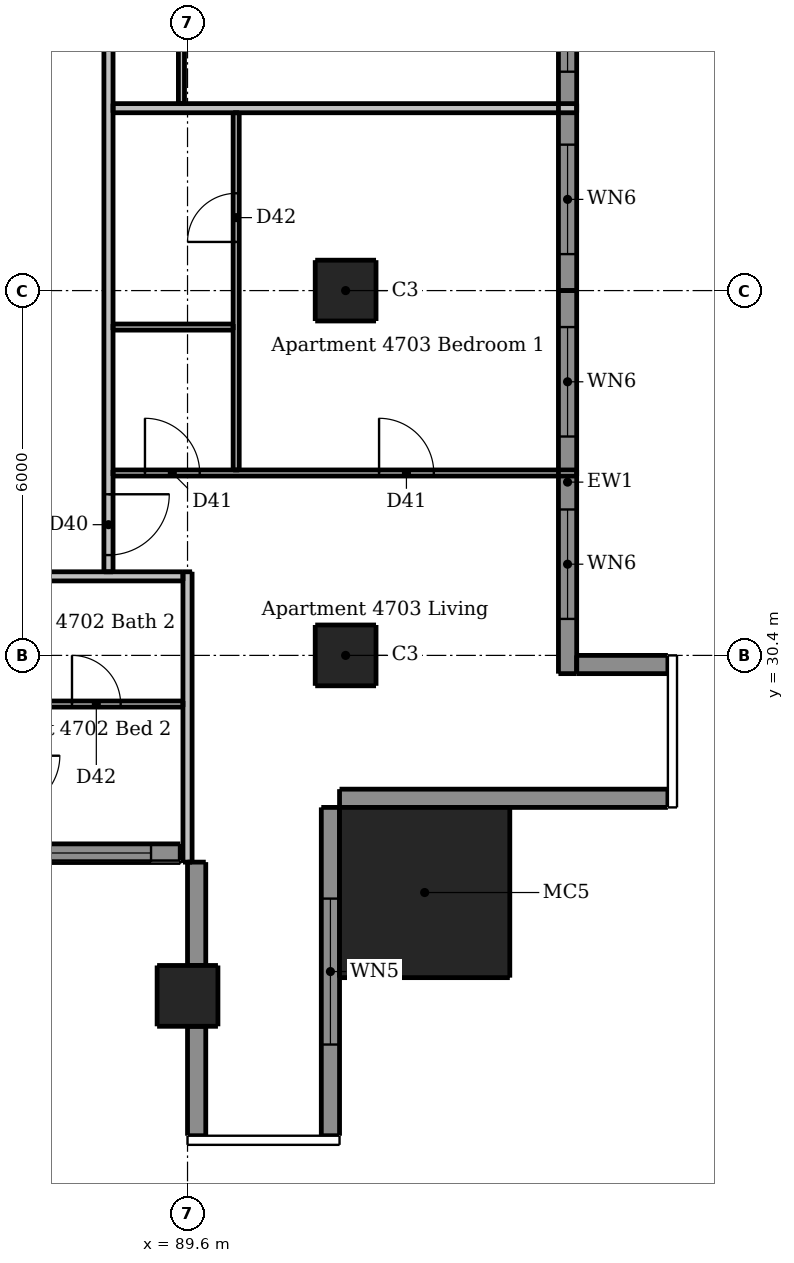
"""IFC4 building model, lengths in metres.
Left out: names, types, materials, properties, quantities, classifications, styles, units other than length and angle.
Written with IfcOpenShell. Run it as: python <this file> out.ifc"""

import sys

from ifc_helpers import new_model, si_unit, direction, frame, frame_2d, origin, origin_2d, place, context, subcontext, project, spatial, rectangle, extrude, element, fill, save


model = new_model("IFC4")
c1 = context("Model", 3, precision=1e-05, world=origin(), true_north=direction((0.0, 1.0)))
c2 = subcontext(c1, "Body", "Model", "MODEL_VIEW")
j1 = project(units=[si_unit("LENGTHUNIT", "METRE"), si_unit("PLANEANGLEUNIT", "RADIAN")], contexts=[c1])
p1 = place(None, origin())
s1 = spatial("IfcSite", under=j1, at=p1, CompositionType="ELEMENT")
p2 = place(p1, origin())
s2 = spatial("IfcBuilding", under=s1, at=p2, CompositionType="ELEMENT")
p3 = place(p2, frame((0.0, 0.0, 174.7)))
s3 = spatial("IfcBuildingStorey", under=s2, at=p3, CompositionType="ELEMENT", Elevation=174.7)
for number, where, z_axis, x_axis in (
    (1, (89.6, 24.8, 0.0), (0.0, 0.0, 1.0), (1.0, 0.0, 0.0)),
    (2, (92.2, 30.4, 0.0), (0.0, 0.0, 1.0), (1.0, 0.0, 0.0)),
    (3, (92.2, 36.4, 0.0), (0.0, 0.0, 1.0), (1.0, 0.0, 0.0)),
):
    element("IfcColumn", number, at=place(p3, frame(where, z_axis=z_axis, x_axis=x_axis)), inside=s3, PredefinedType="COLUMN", context=c2, shape_type="SweptSolid", body=[
        extrude(rectangle(XDim=1.0, YDim=1.0, at=origin_2d()), origin(), (0.0, 0.0, 1.0), 2.95),
    ])
p4 = place(p3, frame((93.5, 26.5, 0.0), z_axis=(0.0, 0.0, 1.0), x_axis=(1.0, 0.0, 0.0)))
e4 = element("IfcColumn", 4, at=p4, inside=s3, PredefinedType="COLUMN", context=c2, shape_type="SweptSolid", body=[
    extrude(rectangle(XDim=2.8, YDim=2.8, at=origin_2d()), origin(), (0.0, 0.0, 1.0), 3.3),
])
p5 = place(p3, frame((89.75, 27.0, 0.0), z_axis=(0.0, 0.0, 1.0), x_axis=(0.0, -1.0, 0.0)))
e5 = element("IfcWall", 5, at=p5, inside=s3, PredefinedType="SOLIDWALL", context=c2, shape_type="SweptSolid", body=[
    extrude(rectangle(XDim=1.7, YDim=0.3, at=frame_2d((0.85, 0.0))), origin(), (0.0, 0.0, 1.0), 2.95),
])
p6 = place(p3, frame((89.75, 24.3, 0.0), z_axis=(0.0, 0.0, 1.0), x_axis=(0.0, -1.0, 0.0)))
e6 = element("IfcWall", 6, at=p6, inside=s3, PredefinedType="SOLIDWALL", context=c2, shape_type="SweptSolid", body=[
    extrude(rectangle(XDim=1.8, YDim=0.3, at=frame_2d((0.9, 0.0))), origin(), (0.0, 0.0, 1.0), 2.95),
])
p7 = place(p3, frame((91.95, 22.5, 0.0), z_axis=(0.0, 0.0, 1.0), x_axis=(0.0, 1.0, 0.0)))
e7 = element("IfcWall", 7, at=p7, inside=s3, PredefinedType="SOLIDWALL", context=c2, shape_type="SweptSolid", body=[
    extrude(rectangle(XDim=5.4, YDim=0.3, at=frame_2d((2.7, 0.0))), origin(), (0.0, 0.0, 1.0), 2.95),
])
p8 = place(p7, frame((1.5, 0.0, 0.15)))
e8 = element("IfcOpeningElement", 8, at=p8, cuts=e7, PredefinedType="OPENING", context=c2, shape_type="SweptSolid", body=[
    extrude(rectangle(XDim=2.4, YDim=2.1, at=frame_2d((1.2, 1.05))), frame((0.0, 0.16, 0.0), z_axis=(0.0, -1.0, 0.0), x_axis=(1.0, 0.0, 0.0)), (0.0, 0.0, 1.0), 0.32),
])
p9 = place(p3, frame((92.1, 28.05, 0.0), z_axis=(0.0, 0.0, 1.0), x_axis=(1.0, 0.0, 0.0)))
e9 = element("IfcWall", 9, at=p9, inside=s3, PredefinedType="SOLIDWALL", context=c2, shape_type="SweptSolid", body=[
    extrude(rectangle(XDim=5.4, YDim=0.3, at=frame_2d((2.7, 0.0))), origin(), (0.0, 0.0, 1.0), 2.95),
])
p10 = place(p3, frame((97.5, 30.25, 0.0), z_axis=(0.0, 0.0, 1.0), x_axis=(-1.0, 0.0, 0.0)))
e10 = element("IfcWall", 10, at=p10, inside=s3, PredefinedType="SOLIDWALL", context=c2, shape_type="SweptSolid", body=[
    extrude(rectangle(XDim=1.5, YDim=0.3, at=frame_2d((0.75, 0.0))), origin(), (0.0, 0.0, 1.0), 2.95),
])
p11 = place(p3, frame((83.72, 27.15, 0.0), z_axis=(0.0, 0.0, 1.0), x_axis=(1.0, 0.0, 0.0)))
e11 = element("IfcWall", 11, at=p11, inside=s3, PredefinedType="SOLIDWALL", context=c2, shape_type="SweptSolid", body=[
    extrude(rectangle(XDim=5.76, YDim=0.3, at=frame_2d((2.88, 0.0))), origin(), (0.0, 0.0, 1.0), 2.95),
])
p12 = place(p11, frame((0.48, 0.0, 0.15)))
e12 = element("IfcOpeningElement", 12, at=p12, cuts=e11, PredefinedType="OPENING", context=c2, shape_type="SweptSolid", body=[
    extrude(rectangle(XDim=1.8, YDim=2.1, at=frame_2d((0.9, 1.05))), frame((0.0, 0.16, 0.0), z_axis=(0.0, -1.0, 0.0), x_axis=(1.0, 0.0, 0.0)), (0.0, 0.0, 1.0), 0.32),
])
p13 = place(p11, frame((3.48, 0.0, 0.15)))
e13 = element("IfcOpeningElement", 13, at=p13, cuts=e11, PredefinedType="OPENING", context=c2, shape_type="SweptSolid", body=[
    extrude(rectangle(XDim=1.8, YDim=2.1, at=frame_2d((0.9, 1.05))), frame((0.0, 0.16, 0.0), z_axis=(0.0, -1.0, 0.0), x_axis=(1.0, 0.0, 0.0)), (0.0, 0.0, 1.0), 0.32),
])
p14 = place(p3, frame((95.85, 30.1, 0.0), z_axis=(0.0, 0.0, 1.0), x_axis=(0.0, 1.0, 0.0)))
e14 = element("IfcWall", 14, at=p14, inside=s3, PredefinedType="SOLIDWALL", context=c2, shape_type="SweptSolid", body=[
    extrude(rectangle(XDim=6.3, YDim=0.3, at=frame_2d((3.15, 0.0))), origin(), (0.0, 0.0, 1.0), 2.34),
])
p15 = place(p14, frame((0.9, 0.0, 0.15)))
e15 = element("IfcOpeningElement", 15, at=p15, cuts=e14, PredefinedType="OPENING", context=c2, shape_type="SweptSolid", body=[
    extrude(rectangle(XDim=1.8, YDim=2.1, at=frame_2d((0.9, 1.05))), frame((0.0, 0.16, 0.0), z_axis=(0.0, -1.0, 0.0), x_axis=(1.0, 0.0, 0.0)), (0.0, 0.0, 1.0), 0.32),
])
p16 = place(p14, frame((3.9, 0.0, 0.15)))
e16 = element("IfcOpeningElement", 16, at=p16, cuts=e14, PredefinedType="OPENING", context=c2, shape_type="SweptSolid", body=[
    extrude(rectangle(XDim=1.8, YDim=2.1, at=frame_2d((0.9, 1.05))), frame((0.0, 0.16, 0.0), z_axis=(0.0, -1.0, 0.0), x_axis=(1.0, 0.0, 0.0)), (0.0, 0.0, 1.0), 0.32),
])
p17 = place(p3, frame((95.85, 36.4, 0.0), z_axis=(0.0, 0.0, 1.0), x_axis=(0.0, 1.0, 0.0)))
e17 = element("IfcWall", 17, at=p17, inside=s3, PredefinedType="SOLIDWALL", context=c2, shape_type="SweptSolid", body=[
    extrude(rectangle(XDim=5.7, YDim=0.3, at=frame_2d((2.85, 0.0))), origin(), (0.0, 0.0, 1.0), 2.34),
])
p18 = place(p17, frame((0.6, 0.0, 0.15)))
e18 = element("IfcOpeningElement", 18, at=p18, cuts=e17, PredefinedType="OPENING", context=c2, shape_type="SweptSolid", body=[
    extrude(rectangle(XDim=1.8, YDim=2.1, at=frame_2d((0.9, 1.05))), frame((0.0, 0.16, 0.0), z_axis=(0.0, -1.0, 0.0), x_axis=(1.0, 0.0, 0.0)), (0.0, 0.0, 1.0), 0.32),
])
p19 = place(p17, frame((3.6, 0.0, 0.15)))
e19 = element("IfcOpeningElement", 19, at=p19, cuts=e17, PredefinedType="OPENING", context=c2, shape_type="SweptSolid", body=[
    extrude(rectangle(XDim=1.8, YDim=2.1, at=frame_2d((0.9, 1.05))), frame((0.0, 0.16, 0.0), z_axis=(0.0, -1.0, 0.0), x_axis=(1.0, 0.0, 0.0)), (0.0, 0.0, 1.0), 0.32),
])
p20 = place(p3, frame((89.5, 60.325, 0.0), z_axis=(0.0, 0.0, 1.0), x_axis=(0.0, -1.0, 0.0)))
e20 = element("IfcWall", 20, at=p20, inside=s3, PredefinedType="PARTITIONING", context=c2, shape_type="SweptSolid", body=[
    extrude(rectangle(XDim=20.85, YDim=0.1, at=frame_2d((10.425, 0.0))), origin(), (0.0, 0.0, 1.0), 2.332),
])
p21 = place(p20, frame((9.675, 0.0, 0.0)))
e21 = element("IfcOpeningElement", 21, at=p21, cuts=e20, PredefinedType="OPENING", context=c2, shape_type="SweptSolid", body=[
    extrude(rectangle(XDim=0.9, YDim=2.1, at=frame_2d((0.45, 1.05))), frame((0.0, 0.06, 0.0), z_axis=(0.0, -1.0, 0.0), x_axis=(1.0, 0.0, 0.0)), (0.0, 0.0, 1.0), 0.12),
])
p22 = place(p20, frame((6.675, 0.0, 0.0)))
e22 = element("IfcOpeningElement", 22, at=p22, cuts=e20, PredefinedType="OPENING", context=c2, shape_type="SweptSolid", body=[
    extrude(rectangle(XDim=0.9, YDim=2.1, at=frame_2d((0.45, 1.05))), frame((0.0, 0.06, 0.0), z_axis=(0.0, -1.0, 0.0), x_axis=(1.0, 0.0, 0.0)), (0.0, 0.0, 1.0), 0.12),
])
p23 = place(p20, frame((18.975, 0.0, 0.0)))
e23 = element("IfcOpeningElement", 23, at=p23, cuts=e20, PredefinedType="OPENING", context=c2, shape_type="SweptSolid", body=[
    extrude(rectangle(XDim=0.9, YDim=2.1, at=frame_2d((0.45, 1.05))), frame((0.0, 0.06, 0.0), z_axis=(0.0, -1.0, 0.0), x_axis=(1.0, 0.0, 0.0)), (0.0, 0.0, 1.0), 0.12),
])
p24 = place(p20, frame((15.975, 0.0, 0.0)))
e24 = element("IfcOpeningElement", 24, at=p24, cuts=e20, PredefinedType="OPENING", context=c2, shape_type="SweptSolid", body=[
    extrude(rectangle(XDim=0.9, YDim=2.1, at=frame_2d((0.45, 1.05))), frame((0.0, 0.06, 0.0), z_axis=(0.0, -1.0, 0.0), x_axis=(1.0, 0.0, 0.0)), (0.0, 0.0, 1.0), 0.12),
])
p25 = place(p20, frame((12.975, 0.0, 0.0)))
e25 = element("IfcOpeningElement", 25, at=p25, cuts=e20, PredefinedType="OPENING", context=c2, shape_type="SweptSolid", body=[
    extrude(rectangle(XDim=0.9, YDim=2.1, at=frame_2d((0.45, 1.05))), frame((0.0, 0.06, 0.0), z_axis=(0.0, -1.0, 0.0), x_axis=(1.0, 0.0, 0.0)), (0.0, 0.0, 1.0), 0.12),
])
p26 = place(p20, frame((1.275, 0.0, 0.0)))
e26 = element("IfcOpeningElement", 26, at=p26, cuts=e20, PredefinedType="OPENING", context=c2, shape_type="SweptSolid", body=[
    extrude(rectangle(XDim=0.9, YDim=2.1, at=frame_2d((0.45, 1.05))), frame((0.0, 0.06, 0.0), z_axis=(0.0, -1.0, 0.0), x_axis=(1.0, 0.0, 0.0)), (0.0, 0.0, 1.0), 0.12),
])
p27 = place(p20, frame((4.325, 0.0, 0.0)))
e27 = element("IfcOpeningElement", 27, at=p27, cuts=e20, PredefinedType="OPENING", context=c2, shape_type="SweptSolid", body=[
    extrude(rectangle(XDim=0.8, YDim=2.1, at=frame_2d((0.4, 1.05))), frame((0.0, 0.06, 0.0), z_axis=(0.0, -1.0, 0.0), x_axis=(1.0, 0.0, 0.0)), (0.0, 0.0, 1.0), 0.12),
])
p28 = place(p3, frame((90.4, 33.45, 0.0), z_axis=(0.0, 0.0, 1.0), x_axis=(0.0, 1.0, 0.0)))
e28 = element("IfcWall", 28, at=p28, inside=s3, PredefinedType="PARTITIONING", context=c2, shape_type="SweptSolid", body=[
    extrude(rectangle(XDim=5.875, YDim=0.1, at=frame_2d((2.938, 0.0))), origin(), (0.0, 0.0, 1.0), 2.95),
])
p29 = place(p28, frame((3.75, 0.0, 0.0)))
e29 = element("IfcOpeningElement", 29, at=p29, cuts=e28, PredefinedType="OPENING", context=c2, shape_type="SweptSolid", body=[
    extrude(rectangle(XDim=0.8, YDim=2.1, at=frame_2d((0.4, 1.05))), frame((0.0, 0.06, 0.0), z_axis=(0.0, -1.0, 0.0), x_axis=(1.0, 0.0, 0.0)), (0.0, 0.0, 1.0), 0.12),
])
p30 = place(p3, frame((88.375, 35.8, 0.0), z_axis=(0.0, 0.0, 1.0), x_axis=(1.0, 0.0, 0.0)))
e30 = element("IfcWall", 30, at=p30, inside=s3, PredefinedType="PARTITIONING", context=c2, shape_type="SweptSolid", body=[
    extrude(rectangle(XDim=1.975, YDim=0.1, at=frame_2d((0.988, 0.0))), origin(), (0.0, 0.0, 1.0), 2.95),
])
p31 = place(p3, frame((88.375, 33.4, 0.0), z_axis=(0.0, 0.0, 1.0), x_axis=(1.0, 0.0, 0.0)))
e31 = element("IfcWall", 31, at=p31, inside=s3, PredefinedType="PARTITIONING", context=c2, shape_type="SweptSolid", body=[
    extrude(rectangle(XDim=7.625, YDim=0.1, at=frame_2d((3.812, 0.0))), origin(), (0.0, 0.0, 1.0), 2.95),
])
p32 = place(p31, frame((0.525, 0.0, 0.0)))
e32 = element("IfcOpeningElement", 32, at=p32, cuts=e31, PredefinedType="OPENING", context=c2, shape_type="SweptSolid", body=[
    extrude(rectangle(XDim=0.9, YDim=2.1, at=frame_2d((0.45, 1.05))), frame((0.0, 0.06, 0.0), z_axis=(0.0, -1.0, 0.0), x_axis=(1.0, 0.0, 0.0)), (0.0, 0.0, 1.0), 0.12),
])
p33 = place(p31, frame((4.375, 0.0, 0.0)))
e33 = element("IfcOpeningElement", 33, at=p33, cuts=e31, PredefinedType="OPENING", context=c2, shape_type="SweptSolid", body=[
    extrude(rectangle(XDim=0.9, YDim=2.1, at=frame_2d((0.45, 1.05))), frame((0.0, 0.06, 0.0), z_axis=(0.0, -1.0, 0.0), x_axis=(1.0, 0.0, 0.0)), (0.0, 0.0, 1.0), 0.12),
])
p34 = place(p3, frame((83.65, 29.6, 0.0), z_axis=(0.0, 0.0, 1.0), x_axis=(1.0, 0.0, 0.0)))
e34 = element("IfcWall", 34, at=p34, inside=s3, PredefinedType="PARTITIONING", context=c2, shape_type="SweptSolid", body=[
    extrude(rectangle(XDim=5.875, YDim=0.1, at=frame_2d((2.938, 0.0))), origin(), (0.0, 0.0, 1.0), 2.95),
])
p35 = place(p34, frame((1.0, 0.0, 0.0)))
e35 = element("IfcOpeningElement", 35, at=p35, cuts=e34, PredefinedType="OPENING", context=c2, shape_type="SweptSolid", body=[
    extrude(rectangle(XDim=0.9, YDim=2.1, at=frame_2d((0.45, 1.05))), frame((0.0, 0.06, 0.0), z_axis=(0.0, -1.0, 0.0), x_axis=(1.0, 0.0, 0.0)), (0.0, 0.0, 1.0), 0.12),
])
p36 = place(p34, frame((4.05, 0.0, 0.0)))
e36 = element("IfcOpeningElement", 36, at=p36, cuts=e34, PredefinedType="OPENING", context=c2, shape_type="SweptSolid", body=[
    extrude(rectangle(XDim=0.8, YDim=2.1, at=frame_2d((0.4, 1.05))), frame((0.0, 0.06, 0.0), z_axis=(0.0, -1.0, 0.0), x_axis=(1.0, 0.0, 0.0)), (0.0, 0.0, 1.0), 0.12),
])
p37 = place(p3, frame((88.3, 61.175, 0.0), z_axis=(0.0, 0.0, 1.0), x_axis=(0.0, -1.0, 0.0)))
e37 = element("IfcWall", 37, at=p37, inside=s3, PredefinedType="PARTITIONING", context=c2, shape_type="SweptSolid", body=[
    extrude(rectangle(XDim=29.4, YDim=0.15, at=frame_2d((14.7, 0.0))), origin(), (0.0, 0.0, 1.0), 2.95),
])
p38 = place(p37, frame((28.125, 0.0, 0.0)))
e38 = element("IfcOpeningElement", 38, at=p38, cuts=e37, PredefinedType="OPENING", context=c2, shape_type="SweptSolid", body=[
    extrude(rectangle(XDim=1.0, YDim=2.1, at=frame_2d((0.5, 1.05))), frame((0.0, 0.085, 0.0), z_axis=(0.0, -1.0, 0.0), x_axis=(1.0, 0.0, 0.0)), (0.0, 0.0, 1.0), 0.17),
])
p39 = place(p37, frame((10.775, 0.0, 0.0)))
e39 = element("IfcOpeningElement", 39, at=p39, cuts=e37, PredefinedType="OPENING", context=c2, shape_type="SweptSolid", body=[
    extrude(rectangle(XDim=1.0, YDim=2.1, at=frame_2d((0.5, 1.05))), frame((0.0, 0.085, 0.0), z_axis=(0.0, -1.0, 0.0), x_axis=(1.0, 0.0, 0.0)), (0.0, 0.0, 1.0), 0.17),
])
p40 = place(p3, frame((89.6, 27.0, 0.0), z_axis=(0.0, 0.0, 1.0), x_axis=(0.0, 1.0, 0.0)))
e40 = element("IfcWall", 40, at=p40, inside=s3, PredefinedType="PARTITIONING", context=c2, shape_type="SweptSolid", body=[
    extrude(rectangle(XDim=4.775, YDim=0.15, at=frame_2d((2.387, 0.0))), origin(), (0.0, 0.0, 1.0), 2.332),
])
p41 = place(p3, frame((88.375, 39.4, 0.0), z_axis=(0.0, 0.0, 1.0), x_axis=(1.0, 0.0, 0.0)))
e41 = element("IfcWall", 41, at=p41, inside=s3, PredefinedType="PARTITIONING", context=c2, shape_type="SweptSolid", body=[
    extrude(rectangle(XDim=7.625, YDim=0.15, at=frame_2d((3.812, 0.0))), origin(), (0.0, 0.0, 1.0), 2.95),
])
p42 = place(p3, frame((89.525, 31.7, 0.0), z_axis=(0.0, 0.0, 1.0), x_axis=(-1.0, 0.0, 0.0)))
e42 = element("IfcWall", 42, at=p42, inside=s3, PredefinedType="PARTITIONING", context=c2, shape_type="SweptSolid", body=[
    extrude(rectangle(XDim=30.55, YDim=0.15, at=frame_2d((15.275, 0.0))), origin(), (0.0, 0.0, 1.0), 2.95),
])
p43 = place(p42, frame((26.775, 0.0, 0.0)))
e43 = element("IfcOpeningElement", 43, at=p43, cuts=e42, PredefinedType="OPENING", context=c2, shape_type="SweptSolid", body=[
    extrude(rectangle(XDim=1.0, YDim=2.1, at=frame_2d((0.5, 1.05))), frame((0.0, 0.085, 0.0), z_axis=(0.0, -1.0, 0.0), x_axis=(1.0, 0.0, 0.0)), (0.0, 0.0, 1.0), 0.17),
])
p44 = place(p42, frame((8.425, 0.0, 0.0)))
e44 = element("IfcOpeningElement", 44, at=p44, cuts=e42, PredefinedType="OPENING", context=c2, shape_type="SweptSolid", body=[
    extrude(rectangle(XDim=1.0, YDim=2.1, at=frame_2d((0.5, 1.05))), frame((0.0, 0.085, 0.0), z_axis=(0.0, -1.0, 0.0), x_axis=(1.0, 0.0, 0.0)), (0.0, 0.0, 1.0), 0.17),
])
p45 = place(p8, origin())
e45 = element("IfcWindow", 45, at=p45, inside=s3, PartitioningType="DOUBLE_PANEL_VERTICAL", PredefinedType="WINDOW", context=c2, shape_type="SweptSolid", body=[
    extrude(rectangle(XDim=2.4, YDim=2.1, at=frame_2d((1.2, 1.05))), frame((0.0, 0.03, 0.0), z_axis=(0.0, -1.0, 0.0), x_axis=(1.0, 0.0, 0.0)), (0.0, 0.0, 1.0), 0.06),
])
fill(e8, e45)
p46 = place(p13, origin())
e46 = element("IfcWindow", 46, at=p46, inside=s3, PartitioningType="DOUBLE_PANEL_VERTICAL", PredefinedType="WINDOW", context=c2, shape_type="SweptSolid", body=[
    extrude(rectangle(XDim=1.8, YDim=2.1, at=frame_2d((0.9, 1.05))), frame((0.0, 0.03, 0.0), z_axis=(0.0, -1.0, 0.0), x_axis=(1.0, 0.0, 0.0)), (0.0, 0.0, 1.0), 0.06),
])
fill(e13, e46)
p47 = place(p15, origin())
e47 = element("IfcWindow", 47, at=p47, inside=s3, PartitioningType="DOUBLE_PANEL_VERTICAL", PredefinedType="WINDOW", context=c2, shape_type="SweptSolid", body=[
    extrude(rectangle(XDim=1.8, YDim=2.1, at=frame_2d((0.9, 1.05))), frame((0.0, 0.03, 0.0), z_axis=(0.0, -1.0, 0.0), x_axis=(1.0, 0.0, 0.0)), (0.0, 0.0, 1.0), 0.06),
])
fill(e15, e47)
p48 = place(p16, origin())
e48 = element("IfcWindow", 48, at=p48, inside=s3, PartitioningType="DOUBLE_PANEL_VERTICAL", PredefinedType="WINDOW", context=c2, shape_type="SweptSolid", body=[
    extrude(rectangle(XDim=1.8, YDim=2.1, at=frame_2d((0.9, 1.05))), frame((0.0, 0.03, 0.0), z_axis=(0.0, -1.0, 0.0), x_axis=(1.0, 0.0, 0.0)), (0.0, 0.0, 1.0), 0.06),
])
fill(e16, e48)
p49 = place(p18, origin())
e49 = element("IfcWindow", 49, at=p49, inside=s3, PartitioningType="DOUBLE_PANEL_VERTICAL", PredefinedType="WINDOW", context=c2, shape_type="SweptSolid", body=[
    extrude(rectangle(XDim=1.8, YDim=2.1, at=frame_2d((0.9, 1.05))), frame((0.0, 0.03, 0.0), z_axis=(0.0, -1.0, 0.0), x_axis=(1.0, 0.0, 0.0)), (0.0, 0.0, 1.0), 0.06),
])
fill(e18, e49)
p50 = place(p19, origin())
e50 = element("IfcWindow", 50, at=p50, inside=s3, PartitioningType="DOUBLE_PANEL_VERTICAL", PredefinedType="WINDOW", context=c2, shape_type="SweptSolid", body=[
    extrude(rectangle(XDim=1.8, YDim=2.1, at=frame_2d((0.9, 1.05))), frame((0.0, 0.03, 0.0), z_axis=(0.0, -1.0, 0.0), x_axis=(1.0, 0.0, 0.0)), (0.0, 0.0, 1.0), 0.06),
])
fill(e19, e50)
p51 = place(p36, origin())
e51 = element("IfcDoor", 51, at=p51, inside=s3, OperationType="SINGLE_SWING_LEFT", PredefinedType="DOOR", context=c2, shape_type="SweptSolid", body=[
    extrude(rectangle(XDim=0.8, YDim=2.1, at=frame_2d((0.4, 1.05))), frame((0.0, 0.025, 0.0), z_axis=(0.0, -1.0, 0.0), x_axis=(1.0, 0.0, 0.0)), (0.0, 0.0, 1.0), 0.05),
])
fill(e36, e51)
p52 = place(p38, origin())
e52 = element("IfcDoor", 52, at=p52, inside=s3, OperationType="SINGLE_SWING_LEFT", PredefinedType="DOOR", context=c2, shape_type="SweptSolid", body=[
    extrude(rectangle(XDim=1.0, YDim=2.1, at=frame_2d((0.5, 1.05))), frame((0.0, 0.025, 0.0), z_axis=(0.0, -1.0, 0.0), x_axis=(1.0, 0.0, 0.0)), (0.0, 0.0, 1.0), 0.05),
])
fill(e38, e52)
p53 = place(p32, origin())
e53 = element("IfcDoor", 53, at=p53, inside=s3, OperationType="SINGLE_SWING_LEFT", PredefinedType="DOOR", context=c2, shape_type="SweptSolid", body=[
    extrude(rectangle(XDim=0.9, YDim=2.1, at=frame_2d((0.45, 1.05))), frame((0.0, 0.025, 0.0), z_axis=(0.0, -1.0, 0.0), x_axis=(1.0, 0.0, 0.0)), (0.0, 0.0, 1.0), 0.05),
])
fill(e32, e53)
p54 = place(p33, origin())
e54 = element("IfcDoor", 54, at=p54, inside=s3, OperationType="SINGLE_SWING_LEFT", PredefinedType="DOOR", context=c2, shape_type="SweptSolid", body=[
    extrude(rectangle(XDim=0.9, YDim=2.1, at=frame_2d((0.45, 1.05))), frame((0.0, 0.025, 0.0), z_axis=(0.0, -1.0, 0.0), x_axis=(1.0, 0.0, 0.0)), (0.0, 0.0, 1.0), 0.05),
])
fill(e33, e54)
p55 = place(p29, origin())
e55 = element("IfcDoor", 55, at=p55, inside=s3, OperationType="SINGLE_SWING_LEFT", PredefinedType="DOOR", context=c2, shape_type="SweptSolid", body=[
    extrude(rectangle(XDim=0.8, YDim=2.1, at=frame_2d((0.4, 1.05))), frame((0.0, 0.025, 0.0), z_axis=(0.0, -1.0, 0.0), x_axis=(1.0, 0.0, 0.0)), (0.0, 0.0, 1.0), 0.05),
])
fill(e29, e55)
save(model, sys.argv[1])
